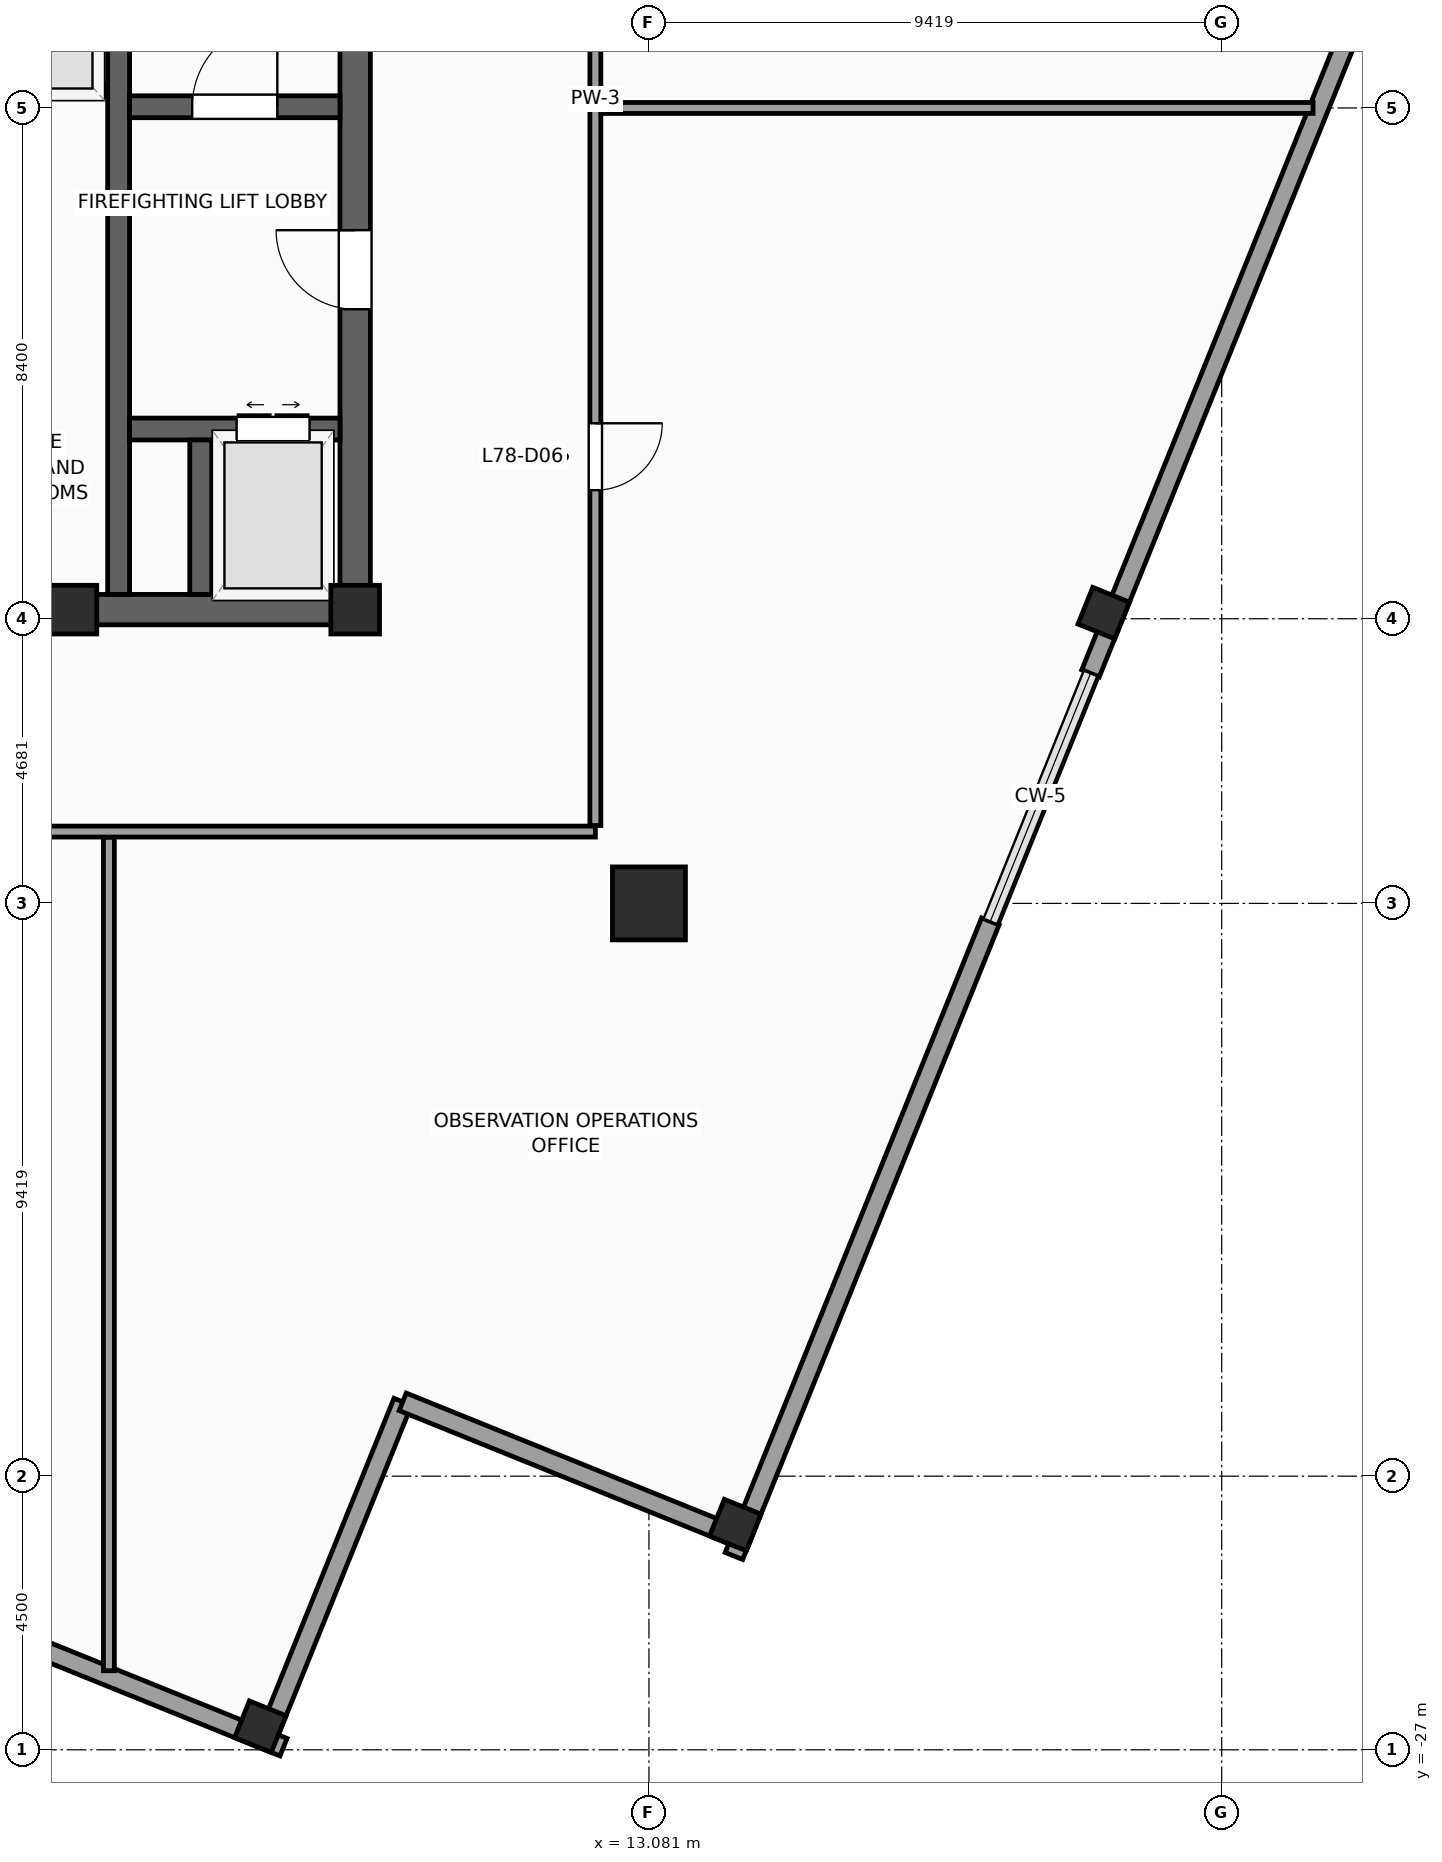
"""IFC4 building model, lengths in metres.
Left out: names, types, materials, properties, quantities, classifications, styles, units other than length and angle.
Written with IfcOpenShell. Run it as: python <this file> out.ifc"""

import sys

from ifc_helpers import new_model, si_unit, direction, frame, frame_2d, origin, origin_2d, place, context, subcontext, project, spatial, rectangle, extrude, source, transform, mapped, element, fill, save


model = new_model("IFC4")
c1 = context("Model", 3, precision=1e-05, world=origin(), true_north=direction((0.0, 1.0)))
c2 = subcontext(c1, "Body", "Model", "MODEL_VIEW")
j1 = project(units=[si_unit("LENGTHUNIT", "METRE"), si_unit("PLANEANGLEUNIT", "RADIAN")], contexts=[c1])
p1 = place(None, origin())
s1 = spatial("IfcSite", under=j1, at=p1, CompositionType="ELEMENT")
p2 = place(p1, origin())
s2 = spatial("IfcBuilding", under=s1, at=p2, CompositionType="ELEMENT")
p3 = place(p2, frame((0.0, 0.0, 316.8)))
s3 = spatial("IfcBuildingStorey", under=s2, at=p3, CompositionType="ELEMENT", Elevation=316.8)
p4 = place(p3, frame((-8.5, -8.25, 0.0), z_axis=(0.0, 0.0, 1.0), x_axis=(1.0, 0.0, 0.0)))
e1 = element("IfcWall", 1, at=p4, inside=s3, PredefinedType="SHEAR", context=c2, shape_type="SweptSolid", body=[
    extrude(rectangle(XDim=17.0, YDim=0.5, at=frame_2d((8.5, 0.0))), origin(), (0.0, 0.0, 1.0), 4.8),
])
p5 = place(p4, frame((7.85, 0.0, 0.0)))
e2 = element("IfcOpeningElement", 2, at=p5, cuts=e1, PredefinedType="OPENING", context=c2, shape_type="SweptSolid", body=[
    extrude(rectangle(XDim=1.3, YDim=2.2, at=frame_2d((0.65, 1.1))), frame((0.0, 0.26, 0.0), z_axis=(0.0, -1.0, 0.0), x_axis=(1.0, 0.0, 0.0)), (0.0, 0.0, 1.0), 0.52),
])
p6 = place(p3, frame((8.25, -8.0, 0.0), z_axis=(0.0, 0.0, 1.0), x_axis=(0.0, 1.0, 0.0)))
e3 = element("IfcWall", 3, at=p6, inside=s3, PredefinedType="SHEAR", context=c2, shape_type="SweptSolid", body=[
    extrude(rectangle(XDim=16.0, YDim=0.5, at=frame_2d((8.0, 0.0))), origin(), (0.0, 0.0, 1.0), 4.8),
])
p7 = place(p6, frame((4.69, 0.0, 0.0)))
e4 = element("IfcOpeningElement", 4, at=p7, cuts=e3, PredefinedType="OPENING", context=c2, shape_type="SweptSolid", body=[
    extrude(rectangle(XDim=1.3, YDim=2.2, at=frame_2d((0.65, 1.1))), frame((0.0, 0.26, 0.0), z_axis=(0.0, -1.0, 0.0), x_axis=(1.0, 0.0, 0.0)), (0.0, 0.0, 1.0), 0.52),
])
p8 = place(p3, frame((4.36, -8.0, 0.0), z_axis=(0.0, 0.0, 1.0), x_axis=(0.0, 1.0, 0.0)))
e5 = element("IfcWall", 5, at=p8, inside=s3, PredefinedType="SHEAR", context=c2, shape_type="SweptSolid", body=[
    extrude(rectangle(XDim=16.0, YDim=0.36, at=frame_2d((8.0, 0.0))), origin(), (0.0, 0.0, 1.0), 4.8),
])
p9 = place(p3, frame((4.54, 0.02, 0.0), z_axis=(0.0, 0.0, 1.0), x_axis=(1.0, 0.0, 0.0)))
e6 = element("IfcWall", 6, at=p9, inside=s3, PredefinedType="SHEAR", context=c2, shape_type="SweptSolid", body=[
    extrude(rectangle(XDim=3.46, YDim=0.36, at=frame_2d((1.73, 0.0))), origin(), (0.0, 0.0, 1.0), 4.8),
])
p10 = place(p9, frame((1.03, 0.0, 0.0)))
e7 = element("IfcOpeningElement", 7, at=p10, cuts=e6, PredefinedType="OPENING", context=c2, shape_type="SweptSolid", body=[
    extrude(rectangle(XDim=1.4, YDim=2.2, at=frame_2d((0.7, 1.1))), frame((0.0, 0.19, 0.0), z_axis=(0.0, -1.0, 0.0), x_axis=(1.0, 0.0, 0.0)), (0.0, 0.0, 1.0), 0.38),
])
p11 = place(p3, frame((4.54, -5.28, 0.0), z_axis=(0.0, 0.0, 1.0), x_axis=(1.0, 0.0, 0.0)))
e8 = element("IfcWall", 8, at=p11, inside=s3, PredefinedType="SHEAR", context=c2, shape_type="SweptSolid", body=[
    extrude(rectangle(XDim=3.46, YDim=0.36, at=frame_2d((1.73, 0.0))), origin(), (0.0, 0.0, 1.0), 4.8),
])
p12 = place(p11, frame((1.76, 0.0, 0.0)))
e9 = element("IfcOpeningElement", 9, at=p12, cuts=e8, PredefinedType="OPENING", context=c2, shape_type="SweptSolid", body=[
    extrude(rectangle(XDim=1.2, YDim=2.25, at=frame_2d((0.6, 1.125))), frame((0.0, 0.19, 0.0), z_axis=(0.0, -1.0, 0.0), x_axis=(1.0, 0.0, 0.0)), (0.0, 0.0, 1.0), 0.38),
])
p13 = place(p3, frame((5.71, -8.0, 0.0), z_axis=(0.0, 0.0, 1.0), x_axis=(0.0, 1.0, 0.0)))
e10 = element("IfcWall", 10, at=p13, inside=s3, PredefinedType="SHEAR", context=c2, shape_type="SweptSolid", body=[
    extrude(rectangle(XDim=2.54, YDim=0.36, at=frame_2d((1.27, 0.0))), origin(), (0.0, 0.0, 1.0), 4.8),
])
m1 = source(origin(), c2, "Body", "SweptSolid", [
    extrude(rectangle(XDim=0.8, YDim=0.8, at=origin_2d()), origin(), (0.0, 0.0, 1.0), 4.8),
])
for number, where, z_axis, x_axis in (
    (11, (8.25, -8.25, 0.0), (0.0, 0.0, 1.0), (1.0, 0.0, 0.0)),
    (12, (3.6, -8.25, 0.0), (0.0, 0.0, 1.0), (1.0, 0.0, 0.0)),
):
    element("IfcColumn", number, at=place(p3, frame(where, z_axis=z_axis, x_axis=x_axis)), inside=s3, PredefinedType="PILASTER", context=c2, shape_type="MappedRepresentation", body=[
        mapped(m1, transform((0.0, 0.0, 0.0), scale=1.0)),
    ])
m2 = source(origin(), c2, "Body", "SweptSolid", [
    extrude(rectangle(XDim=1.2, YDim=1.2, at=origin_2d()), origin(), (0.0, 0.0, 1.0), 4.8),
])
p14 = place(p3, frame((13.081, -13.081, 0.0), z_axis=(0.0, 0.0, 1.0), x_axis=(1.0, 0.0, 0.0)))
e13 = element("IfcColumn", 13, at=p14, inside=s3, PredefinedType="COLUMN", context=c2, shape_type="MappedRepresentation", body=[
    mapped(m2, transform((0.0, 0.0, 0.0), scale=1.0)),
])
m3 = source(origin(), c2, "Body", "SweptSolid", [
    extrude(rectangle(XDim=0.65, YDim=0.65, at=origin_2d()), origin(), (0.0, 0.0, 1.0), 4.8),
])
for number, where, z_axis, x_axis in (
    (14, (14.501, -23.304, 0.0), (0.0, 0.0, 1.0), (0.375, 0.927, 0.0)),
    (15, (20.56, -8.307, 0.0), (0.0, 0.0, 1.0), (0.375, 0.927, 0.0)),
    (16, (6.69, -26.62, 0.0), (0.0, 0.0, 1.0), (0.375, 0.927, 0.0)),
):
    element("IfcColumn", number, at=place(p3, frame(where, z_axis=z_axis, x_axis=x_axis)), inside=s3, PredefinedType="COLUMN", context=c2, shape_type="MappedRepresentation", body=[
        mapped(m3, transform((0.0, 0.0, 0.0), scale=1.0)),
    ])
p15 = place(p3, frame((6.784, -26.841, 0.0), z_axis=(0.0, 0.0, 1.0), x_axis=(0.374636620962, 0.927171722085, 0.0)))
e17 = element("IfcWall", 17, at=p15, inside=s3, PredefinedType="STANDARD", context=c2, shape_type="SweptSolid", body=[
    extrude(rectangle(XDim=6.0, YDim=0.31, at=frame_2d((3.0, 0.0))), origin(), (0.0, 0.0, 1.0), 2.92),
])
p16 = place(p3, frame((9.032, -21.278, 0.0), z_axis=(0.0, 0.0, 1.0), x_axis=(0.927185411764, -0.374602739196, 0.0)))
e18 = element("IfcWall", 18, at=p16, inside=s3, PredefinedType="STANDARD", context=c2, shape_type="SweptSolid", body=[
    extrude(rectangle(XDim=6.155, YDim=0.31, at=frame_2d((3.078, 0.0))), origin(), (0.0, 0.0, 1.0), 4.5),
])
p17 = place(p3, frame((14.479, -23.813, 0.0), z_axis=(0.0, 0.0, 1.0), x_axis=(0.374619777991, 0.927178527544, 0.0)))
e19 = element("IfcWall", 19, at=p17, inside=s3, PredefinedType="STANDARD", context=c2, shape_type="SweptSolid", body=[
    extrude(rectangle(XDim=11.255, YDim=0.31, at=frame_2d((5.627, 0.0))), origin(), (0.0, 0.0, 1.0), 2.92),
])
p18 = place(p3, frame((20.343, -9.298, 0.0), z_axis=(0.0, 0.0, 1.0), x_axis=(0.374607087443, 0.927183654967, 0.0)))
e20 = element("IfcWall", 20, at=p18, inside=s3, PredefinedType="STANDARD", context=c2, shape_type="SweptSolid", body=[
    extrude(rectangle(XDim=17.655, YDim=0.31, at=frame_2d((8.828, 0.0))), origin(), (0.0, 0.0, 1.0), 2.92),
])
p19 = place(p3, frame((-8.371, -20.718, 0.0), z_axis=(0.0, 0.0, 1.0), x_axis=(0.927186231382, -0.374600710538, 0.0)))
e21 = element("IfcWall", 21, at=p19, inside=s3, PredefinedType="STANDARD", context=c2, shape_type="SweptSolid", body=[
    extrude(rectangle(XDim=16.655, YDim=0.31, at=frame_2d((8.328, 0.0))), origin(), (0.0, 0.0, 1.0), 2.92),
])
p20 = place(p19, frame((7.2, 0.0, 0.0)))
e22 = element("IfcOpeningElement", 22, at=p20, cuts=e21, PredefinedType="OPENING", context=c2, shape_type="SweptSolid", body=[
    extrude(rectangle(XDim=1.2, YDim=2.3, at=frame_2d((0.6, 1.15))), frame((0.0, 0.165, 0.0), z_axis=(0.0, -1.0, 0.0), x_axis=(1.0, 0.0, 0.0)), (0.0, 0.0, 1.0), 0.33),
])
p21 = place(p3, frame((1.89, 0.3, 0.0), z_axis=(0.0, 0.0, 1.0), x_axis=(1.0, 0.0, 0.0)))
e23 = element("IfcWall", 23, at=p21, inside=s3, PredefinedType="PARTITIONING", context=c2, shape_type="SweptSolid", body=[
    extrude(rectangle(XDim=2.28, YDim=0.18, at=frame_2d((1.14, 0.0))), origin(), (0.0, 0.0, 1.0), 4.5),
])
p22 = place(p3, frame((-11.9, -11.9, 0.0), z_axis=(0.0, 0.0, 1.0), x_axis=(1.0, 0.0, 0.0)))
e24 = element("IfcWall", 24, at=p22, inside=s3, PredefinedType="PARTITIONING", context=c2, shape_type="SweptSolid", body=[
    extrude(rectangle(XDim=24.1, YDim=0.18, at=frame_2d((12.05, 0.0))), origin(), (0.0, 0.0, 1.0), 4.5),
])
p23 = place(p22, frame((11.35, 0.0, 0.0)))
e25 = element("IfcOpeningElement", 25, at=p23, cuts=e24, PredefinedType="OPENING", context=c2, shape_type="SweptSolid", body=[
    extrude(rectangle(XDim=1.1, YDim=2.2, at=frame_2d((0.55, 1.1))), frame((0.0, 0.1, 0.0), z_axis=(0.0, -1.0, 0.0), x_axis=(1.0, 0.0, 0.0)), (0.0, 0.0, 1.0), 0.2),
])
p24 = place(p22, frame((3.464, 0.0, 0.0)))
e26 = element("IfcOpeningElement", 26, at=p24, cuts=e24, PredefinedType="OPENING", context=c2, shape_type="SweptSolid", body=[
    extrude(rectangle(XDim=1.1, YDim=2.2, at=frame_2d((0.55, 1.1))), frame((0.0, 0.1, 0.0), z_axis=(0.0, -1.0, 0.0), x_axis=(1.0, 0.0, 0.0)), (0.0, 0.0, 1.0), 0.2),
])
p25 = place(p3, frame((12.2, -11.8, 0.0), z_axis=(0.0, 0.0, 1.0), x_axis=(0.0, 1.0, 0.0)))
e27 = element("IfcWall", 27, at=p25, inside=s3, PredefinedType="PARTITIONING", context=c2, shape_type="SweptSolid", body=[
    extrude(rectangle(XDim=23.9, YDim=0.18, at=frame_2d((11.95, 0.0))), origin(), (0.0, 0.0, 1.0), 4.5),
])
p26 = place(p25, frame((17.135, 0.0, 0.0)))
e28 = element("IfcOpeningElement", 28, at=p26, cuts=e27, PredefinedType="OPENING", context=c2, shape_type="SweptSolid", body=[
    extrude(rectangle(XDim=1.1, YDim=2.2, at=frame_2d((0.55, 1.1))), frame((0.0, 0.1, 0.0), z_axis=(0.0, -1.0, 0.0), x_axis=(1.0, 0.0, 0.0)), (0.0, 0.0, 1.0), 0.2),
])
p27 = place(p25, frame((5.514, 0.0, 0.0)))
e29 = element("IfcOpeningElement", 29, at=p27, cuts=e27, PredefinedType="OPENING", context=c2, shape_type="SweptSolid", body=[
    extrude(rectangle(XDim=1.1, YDim=2.2, at=frame_2d((0.55, 1.1))), frame((0.0, 0.1, 0.0), z_axis=(0.0, -1.0, 0.0), x_axis=(1.0, 0.0, 0.0)), (0.0, 0.0, 1.0), 0.2),
])
p28 = place(p3, frame((12.295, 0.0, 0.0), z_axis=(0.0, 0.0, 1.0), x_axis=(1.0, 0.0, 0.0)))
e30 = element("IfcWall", 30, at=p28, inside=s3, PredefinedType="PARTITIONING", context=c2, shape_type="SweptSolid", body=[
    extrude(rectangle(XDim=11.708, YDim=0.18, at=frame_2d((5.854, 0.0))), origin(), (0.0, 0.0, 1.0), 4.5),
])
p29 = place(p3, frame((4.2, -11.995, 0.0), z_axis=(0.0, 0.0, 1.0), x_axis=(0.0, -1.0, 0.0)))
e31 = element("IfcWall", 31, at=p29, inside=s3, PredefinedType="PARTITIONING", context=c2, shape_type="SweptSolid", body=[
    extrude(rectangle(XDim=13.705, YDim=0.18, at=frame_2d((6.852, 0.0))), origin(), (0.0, 0.0, 1.0), 4.5),
])
m4 = source(origin(), c2, "Body", "SweptSolid", [
    extrude(rectangle(XDim=1.4, YDim=2.2, at=frame_2d((0.7, 1.1))), frame((0.0, 0.025, 0.0), z_axis=(0.0, -1.0, 0.0), x_axis=(1.0, 0.0, 0.0)), (0.0, 0.0, 1.0), 0.05),
])
p30 = place(p10, origin())
e32 = element("IfcDoor", 32, at=p30, inside=s3, OperationType="SINGLE_SWING_RIGHT", PredefinedType="DOOR", context=c2, shape_type="MappedRepresentation", body=[
    mapped(m4, transform((0.0, 0.0, 0.0), scale=1.0)),
])
fill(e7, e32)
m5 = source(origin(), c2, "Body", "SweptSolid", [
    extrude(rectangle(XDim=1.3, YDim=2.2, at=frame_2d((0.65, 1.1))), frame((0.0, 0.025, 0.0), z_axis=(0.0, -1.0, 0.0), x_axis=(1.0, 0.0, 0.0)), (0.0, 0.0, 1.0), 0.05),
])
p31 = place(p7, origin())
e33 = element("IfcDoor", 33, at=p31, inside=s3, OperationType="SINGLE_SWING_RIGHT", PredefinedType="DOOR", context=c2, shape_type="MappedRepresentation", body=[
    mapped(m5, transform((0.0, 0.0, 0.0), scale=1.0)),
])
fill(e4, e33)
m6 = source(origin(), c2, "Body", "SweptSolid", [
    extrude(rectangle(XDim=1.2, YDim=2.25, at=frame_2d((0.6, 1.125))), frame((0.0, 0.025, 0.0), z_axis=(0.0, -1.0, 0.0), x_axis=(1.0, 0.0, 0.0)), (0.0, 0.0, 1.0), 0.05),
])
p32 = place(p12, origin())
e34 = element("IfcDoor", 34, at=p32, inside=s3, OperationType="DOUBLE_DOOR_SLIDING", PredefinedType="DOOR", context=c2, shape_type="MappedRepresentation", body=[
    mapped(m6, transform((0.0, 0.0, 0.0), scale=1.0)),
])
fill(e9, e34)
m7 = source(origin(), c2, "Body", "SweptSolid", [
    extrude(rectangle(XDim=1.1, YDim=2.2, at=frame_2d((0.55, 1.1))), frame((0.0, 0.025, 0.0), z_axis=(0.0, -1.0, 0.0), x_axis=(1.0, 0.0, 0.0)), (0.0, 0.0, 1.0), 0.05),
])
p33 = place(p27, frame((1.1, 0.0, 0.0), z_axis=(0.0, 0.0, 1.0), x_axis=(-1.0, 0.0, 0.0)))
e35 = element("IfcDoor", 35, at=p33, inside=s3, OperationType="SINGLE_SWING_RIGHT", PredefinedType="DOOR", context=c2, shape_type="MappedRepresentation", body=[
    mapped(m7, transform((0.0, 0.0, 0.0), scale=1.0)),
])
fill(e29, e35)
save(model, sys.argv[1])
